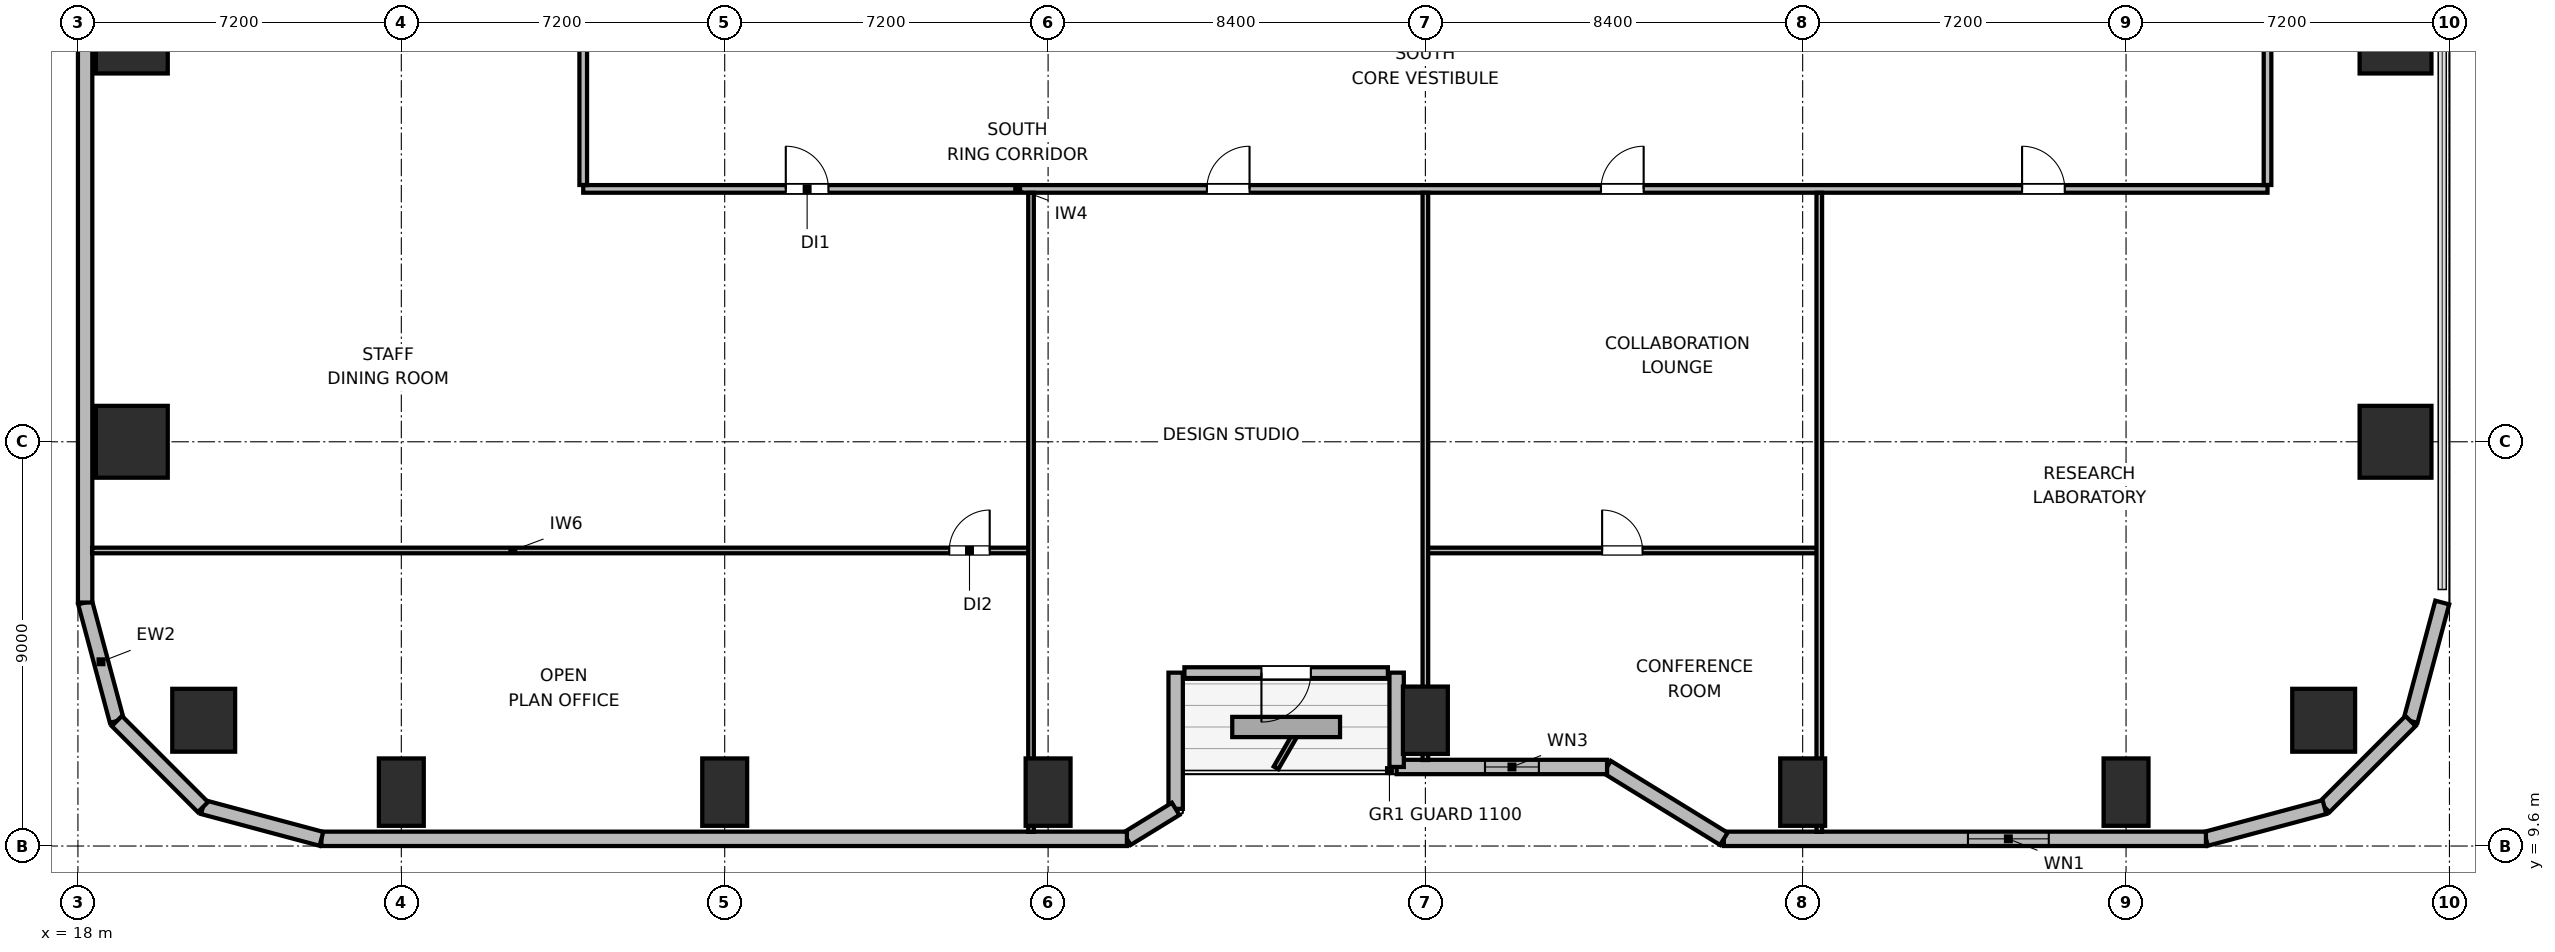
"""IFC4 building model, lengths in metres.
Left out: names, types, materials, properties, quantities, classifications, styles, units other than length and angle.
Written with IfcOpenShell. Run it as: python <this file> out.ifc"""

import sys

from ifc_helpers import new_model, si_unit, direction, frame, frame_2d, origin, origin_2d, place, context, subcontext, project, spatial, rectangle, circle, extrude, element, fill, save


model = new_model("IFC4")
c1 = context("Model", 3, precision=1e-05, world=origin(), true_north=direction((0.0, 1.0)))
c2 = subcontext(c1, "Body", "Model", "MODEL_VIEW")
j1 = project(units=[si_unit("LENGTHUNIT", "METRE"), si_unit("PLANEANGLEUNIT", "RADIAN")], contexts=[c1])
p1 = place(None, origin())
s1 = spatial("IfcSite", under=j1, at=p1, CompositionType="ELEMENT")
p2 = place(p1, origin())
s2 = spatial("IfcBuilding", under=s1, at=p2, CompositionType="ELEMENT")
p3 = place(p2, frame((0.0, 0.0, 85.8)))
s3 = spatial("IfcBuildingStorey", under=s2, at=p3, CompositionType="ELEMENT", Elevation=85.8)
for number, where, z_axis, x_axis in (
    (1, (20.8, 12.4, 0.0), (0.0, 0.0, 1.0), (1.0, 0.0, 0.0)),
    (2, (68.0, 12.4, 0.0), (0.0, 0.0, 1.0), (1.0, 0.0, 0.0)),
):
    element("IfcColumn", number, at=place(p3, frame(where, z_axis=z_axis, x_axis=x_axis)), inside=s3, PredefinedType="COLUMN", context=c2, shape_type="SweptSolid", body=[
        extrude(circle(Radius=0.7, at=origin_2d()), origin(), (0.0, 0.0, 1.0), 3.9),
    ])
for number, where, z_axis, x_axis in (
    (3, (25.2, 10.8, 0.0), (0.0, 0.0, 1.0), (1.0, 0.0, 0.0)),
    (4, (32.4, 10.8, 0.0), (0.0, 0.0, 1.0), (1.0, 0.0, 0.0)),
    (5, (39.6, 10.8, 0.0), (0.0, 0.0, 1.0), (1.0, 0.0, 0.0)),
    (6, (48.0, 12.4, 0.0), (0.0, 0.0, 1.0), (1.0, 0.0, 0.0)),
    (7, (56.4, 10.8, 0.0), (0.0, 0.0, 1.0), (1.0, 0.0, 0.0)),
    (8, (63.6, 10.8, 0.0), (0.0, 0.0, 1.0), (1.0, 0.0, 0.0)),
):
    element("IfcColumn", number, at=place(p3, frame(where, z_axis=z_axis, x_axis=x_axis)), inside=s3, PredefinedType="COLUMN", context=c2, shape_type="SweptSolid", body=[
        extrude(rectangle(XDim=1.0, YDim=1.5, at=origin_2d()), origin(), (0.0, 0.0, 1.0), 3.9),
    ])
for number, where, z_axis, x_axis in (
    (9, (19.2, 18.6, 0.0), (0.0, 0.0, 1.0), (1.0, 0.0, 0.0)),
    (10, (69.6, 18.6, 0.0), (0.0, 0.0, 1.0), (1.0, 0.0, 0.0)),
    (11, (19.2, 27.6, 0.0), (0.0, 0.0, 1.0), (1.0, 0.0, 0.0)),
    (12, (69.6, 27.6, 0.0), (0.0, 0.0, 1.0), (1.0, 0.0, 0.0)),
):
    element("IfcColumn", number, at=place(p3, frame(where, z_axis=z_axis, x_axis=x_axis)), inside=s3, PredefinedType="COLUMN", context=c2, shape_type="SweptSolid", body=[
        extrude(rectangle(XDim=1.6, YDim=1.6, at=origin_2d()), origin(), (0.0, 0.0, 1.0), 3.9),
    ])
p4 = place(p3, frame((18.866, 12.383, 0.0), z_axis=(0.0, 0.0, 1.0), x_axis=(-0.25869736047, 0.965958423373, 0.0)))
e13 = element("IfcWall", 13, at=p4, inside=s3, PredefinedType="SOLIDWALL", context=c2, shape_type="SweptSolid", body=[
    extrude(rectangle(XDim=2.731, YDim=0.32, at=frame_2d((1.366, 0.0))), origin(), (0.0, 0.0, 1.0), 3.64),
])
p5 = place(p3, frame((18.16, 15.021, 0.0), z_axis=(0.0, 0.0, 1.0), x_axis=(0.0, 1.0, 0.0)))
e14 = element("IfcWall", 14, at=p5, inside=s3, PredefinedType="SOLIDWALL", context=c2, shape_type="SweptSolid", body=[
    extrude(rectangle(XDim=14.219, YDim=0.32, at=frame_2d((7.109, 0.0))), origin(), (0.0, 0.0, 1.0), 3.64),
])
p6 = place(p3, frame((70.64, 15.021, 0.0), z_axis=(0.0, 0.0, 1.0), x_axis=(-0.258613949072, -0.965980758269, 0.0)))
e15 = element("IfcWall", 15, at=p6, inside=s3, PredefinedType="SOLIDWALL", context=c2, shape_type="SweptSolid", body=[
    extrude(rectangle(XDim=2.731, YDim=0.32, at=frame_2d((1.366, 0.0))), origin(), (0.0, 0.0, 1.0), 3.64),
])
p7 = place(p3, frame((69.934, 12.383, 0.0), z_axis=(0.0, 0.0, 1.0), x_axis=(-0.707151821269, -0.707061738235, 0.0)))
e16 = element("IfcWall", 16, at=p7, inside=s3, PredefinedType="SOLIDWALL", context=c2, shape_type="SweptSolid", body=[
    extrude(rectangle(XDim=2.71, YDim=0.32, at=frame_2d((1.355, 0.0))), origin(), (0.0, 0.0, 1.0), 3.64),
])
p8 = place(p3, frame((68.017, 10.467, 0.0), z_axis=(0.0, 0.0, 1.0), x_axis=(-0.965958423373, -0.25869736047, 0.0)))
e17 = element("IfcWall", 17, at=p8, inside=s3, PredefinedType="SOLIDWALL", context=c2, shape_type="SweptSolid", body=[
    extrude(rectangle(XDim=2.731, YDim=0.32, at=frame_2d((1.366, 0.0))), origin(), (0.0, 0.0, 1.0), 3.64),
])
p9 = place(p3, frame((65.379, 9.76, 0.0), z_axis=(0.0, 0.0, 1.0), x_axis=(-1.0, 0.0, 0.0)))
e18 = element("IfcWall", 18, at=p9, inside=s3, PredefinedType="SOLIDWALL", context=c2, shape_type="SweptSolid", body=[
    extrude(rectangle(XDim=10.734, YDim=0.32, at=frame_2d((5.367, 0.0))), origin(), (0.0, 0.0, 1.0), 3.64),
])
p10 = place(p9, frame((3.499, 0.0, 0.85)))
e19 = element("IfcOpeningElement", 19, at=p10, cuts=e18, PredefinedType="OPENING", context=c2, shape_type="SweptSolid", body=[
    extrude(rectangle(XDim=1.8, YDim=1.1, at=frame_2d((0.9, 0.55))), frame((0.0, 0.17, 0.0), z_axis=(0.0, -1.0, 0.0), x_axis=(1.0, 0.0, 0.0)), (0.0, 0.0, 1.0), 0.34),
])
p11 = place(p3, frame((54.645, 9.76, 0.0), z_axis=(0.0, 0.0, 1.0), x_axis=(-0.851630857047, 0.524142044989, 0.0)))
e20 = element("IfcWall", 20, at=p11, inside=s3, PredefinedType="SOLIDWALL", context=c2, shape_type="SweptSolid", body=[
    extrude(rectangle(XDim=3.053, YDim=0.32, at=frame_2d((1.526, 0.0))), origin(), (0.0, 0.0, 1.0), 2.875),
])
p12 = place(p3, frame((52.045, 11.36, 0.0), z_axis=(0.0, 0.0, 1.0), x_axis=(-1.0, 0.0, 0.0)))
e21 = element("IfcWall", 21, at=p12, inside=s3, PredefinedType="SOLIDWALL", context=c2, shape_type="SweptSolid", body=[
    extrude(rectangle(XDim=4.685, YDim=0.32, at=frame_2d((2.343, 0.0))), origin(), (0.0, 0.0, 1.0), 2.875),
])
p13 = place(p12, frame((1.518, 0.0, 0.85)))
e22 = element("IfcOpeningElement", 22, at=p13, cuts=e21, PredefinedType="OPENING", context=c2, shape_type="SweptSolid", body=[
    extrude(rectangle(XDim=1.2, YDim=1.1, at=frame_2d((0.6, 0.55))), frame((0.0, 0.17, 0.0), z_axis=(0.0, -1.0, 0.0), x_axis=(1.0, 0.0, 0.0)), (0.0, 0.0, 1.0), 0.34),
])
p14 = place(p3, frame((47.36, 11.36, 0.0), z_axis=(0.0, 0.0, 1.0), x_axis=(0.0, 1.0, 0.0)))
e23 = element("IfcWall", 23, at=p14, inside=s3, PredefinedType="SOLIDWALL", context=c2, shape_type="SweptSolid", body=[
    extrude(rectangle(XDim=2.1, YDim=0.32, at=frame_2d((1.05, 0.0))), origin(), (0.0, 0.0, 1.0), 2.875),
])
p15 = place(p3, frame((47.165, 13.46, 0.0), z_axis=(0.0, 0.0, 1.0), x_axis=(-1.0, 0.0, 0.0)))
e24 = element("IfcWall", 24, at=p15, inside=s3, PredefinedType="SOLIDWALL", context=c2, shape_type="SweptSolid", body=[
    extrude(rectangle(XDim=4.53, YDim=0.24, at=frame_2d((2.265, 0.0))), origin(), (0.0, 0.0, 1.0), 3.64),
])
p16 = place(p15, frame((1.715, 0.0, 0.0)))
e25 = element("IfcOpeningElement", 25, at=p16, cuts=e24, PredefinedType="OPENING", context=c2, shape_type="SweptSolid", body=[
    extrude(rectangle(XDim=1.1, YDim=2.04, at=frame_2d((0.55, 1.02))), frame((0.0, 0.13, 0.0), z_axis=(0.0, -1.0, 0.0), x_axis=(1.0, 0.0, 0.0)), (0.0, 0.0, 1.0), 0.26),
])
p17 = place(p3, frame((42.44, 13.46, 0.0), z_axis=(0.0, 0.0, 1.0), x_axis=(0.0, -1.0, 0.0)))
e26 = element("IfcWall", 26, at=p17, inside=s3, PredefinedType="SOLIDWALL", context=c2, shape_type="SweptSolid", body=[
    extrude(rectangle(XDim=3.032, YDim=0.32, at=frame_2d((1.516, 0.0))), origin(), (0.0, 0.0, 1.0), 2.875),
])
p18 = place(p3, frame((42.44, 10.427, 0.0), z_axis=(0.0, 0.0, 1.0), x_axis=(-0.851776724646, -0.523904964045, 0.0)))
e27 = element("IfcWall", 27, at=p18, inside=s3, PredefinedType="SOLIDWALL", context=c2, shape_type="SweptSolid", body=[
    extrude(rectangle(XDim=1.274, YDim=0.32, at=frame_2d((0.637, 0.0))), origin(), (0.0, 0.0, 1.0), 3.64),
])
p19 = place(p3, frame((41.355, 9.76, 0.0), z_axis=(0.0, 0.0, 1.0), x_axis=(-1.0, 0.0, 0.0)))
e28 = element("IfcWall", 28, at=p19, inside=s3, PredefinedType="SOLIDWALL", context=c2, shape_type="SweptSolid", body=[
    extrude(rectangle(XDim=17.934, YDim=0.32, at=frame_2d((8.967, 0.0))), origin(), (0.0, 0.0, 1.0), 3.64),
])
p20 = place(p3, frame((23.421, 9.76, 0.0), z_axis=(0.0, 0.0, 1.0), x_axis=(-0.965964405026, 0.25867502435, 0.0)))
e29 = element("IfcWall", 29, at=p20, inside=s3, PredefinedType="SOLIDWALL", context=c2, shape_type="SweptSolid", body=[
    extrude(rectangle(XDim=2.731, YDim=0.32, at=frame_2d((1.366, 0.0))), origin(), (0.0, 0.0, 1.0), 3.64),
])
p21 = place(p3, frame((20.783, 10.467, 0.0), z_axis=(0.0, 0.0, 1.0), x_axis=(-0.707106781187, 0.707106781187, 0.0)))
e30 = element("IfcWall", 30, at=p21, inside=s3, PredefinedType="SOLIDWALL", context=c2, shape_type="SweptSolid", body=[
    extrude(rectangle(XDim=2.71, YDim=0.32, at=frame_2d((1.355, 0.0))), origin(), (0.0, 0.0, 1.0), 3.64),
])
p22 = place(p3, frame((29.25, 24.23, 0.0), z_axis=(0.0, 0.0, 1.0), x_axis=(1.0, 0.0, 0.0)))
e31 = element("IfcWall", 31, at=p22, inside=s3, PredefinedType="PARTITIONING", context=c2, shape_type="SweptSolid", body=[
    extrude(rectangle(XDim=37.5, YDim=0.17, at=frame_2d((18.75, 0.0))), origin(), (0.0, 0.0, 1.0), 3.64),
])
p23 = place(p22, frame((4.51, 0.0, 0.0)))
e32 = element("IfcOpeningElement", 32, at=p23, cuts=e31, PredefinedType="OPENING", context=c2, shape_type="SweptSolid", body=[
    extrude(rectangle(XDim=0.95, YDim=2.04, at=frame_2d((0.475, 1.02))), frame((0.0, 0.095, 0.0), z_axis=(0.0, -1.0, 0.0), x_axis=(1.0, 0.0, 0.0)), (0.0, 0.0, 1.0), 0.19),
])
p24 = place(p22, frame((13.885, 0.0, 0.0)))
e33 = element("IfcOpeningElement", 33, at=p24, cuts=e31, PredefinedType="OPENING", context=c2, shape_type="SweptSolid", body=[
    extrude(rectangle(XDim=0.95, YDim=2.04, at=frame_2d((0.475, 1.02))), frame((0.0, 0.095, 0.0), z_axis=(0.0, -1.0, 0.0), x_axis=(1.0, 0.0, 0.0)), (0.0, 0.0, 1.0), 0.19),
])
p25 = place(p22, frame((22.66, 0.0, 0.0)))
e34 = element("IfcOpeningElement", 34, at=p25, cuts=e31, PredefinedType="OPENING", context=c2, shape_type="SweptSolid", body=[
    extrude(rectangle(XDim=0.95, YDim=2.04, at=frame_2d((0.475, 1.02))), frame((0.0, 0.095, 0.0), z_axis=(0.0, -1.0, 0.0), x_axis=(1.0, 0.0, 0.0)), (0.0, 0.0, 1.0), 0.19),
])
p26 = place(p22, frame((32.035, 0.0, 0.0)))
e35 = element("IfcOpeningElement", 35, at=p26, cuts=e31, PredefinedType="OPENING", context=c2, shape_type="SweptSolid", body=[
    extrude(rectangle(XDim=0.95, YDim=2.04, at=frame_2d((0.475, 1.02))), frame((0.0, 0.095, 0.0), z_axis=(0.0, -1.0, 0.0), x_axis=(1.0, 0.0, 0.0)), (0.0, 0.0, 1.0), 0.19),
])
p27 = place(p3, frame((29.25, 24.317, 0.0), z_axis=(0.0, 0.0, 1.0), x_axis=(0.0, 1.0, 0.0)))
e36 = element("IfcWall", 36, at=p27, inside=s3, PredefinedType="PARTITIONING", context=c2, shape_type="SweptSolid", body=[
    extrude(rectangle(XDim=23.366, YDim=0.17, at=frame_2d((11.683, 0.0))), origin(), (0.0, 0.0, 1.0), 3.64),
])
p28 = place(p27, frame((4.023, 0.0, 0.0)))
e37 = element("IfcOpeningElement", 37, at=p28, cuts=e36, PredefinedType="OPENING", context=c2, shape_type="SweptSolid", body=[
    extrude(rectangle(XDim=0.95, YDim=2.04, at=frame_2d((0.475, 1.02))), frame((0.0, 0.095, 0.0), z_axis=(0.0, -1.0, 0.0), x_axis=(1.0, 0.0, 0.0)), (0.0, 0.0, 1.0), 0.19),
])
p29 = place(p27, frame((11.808, 0.0, 0.0)))
e38 = element("IfcOpeningElement", 38, at=p29, cuts=e36, PredefinedType="OPENING", context=c2, shape_type="SweptSolid", body=[
    extrude(rectangle(XDim=0.95, YDim=2.04, at=frame_2d((0.475, 1.02))), frame((0.0, 0.095, 0.0), z_axis=(0.0, -1.0, 0.0), x_axis=(1.0, 0.0, 0.0)), (0.0, 0.0, 1.0), 0.19),
])
p30 = place(p27, frame((18.993, 0.0, 0.0)))
e39 = element("IfcOpeningElement", 39, at=p30, cuts=e36, PredefinedType="OPENING", context=c2, shape_type="SweptSolid", body=[
    extrude(rectangle(XDim=0.95, YDim=2.04, at=frame_2d((0.475, 1.02))), frame((0.0, 0.095, 0.0), z_axis=(0.0, -1.0, 0.0), x_axis=(1.0, 0.0, 0.0)), (0.0, 0.0, 1.0), 0.19),
])
p31 = place(p3, frame((66.75, 24.317, 0.0), z_axis=(0.0, 0.0, 1.0), x_axis=(0.0, 1.0, 0.0)))
e40 = element("IfcWall", 40, at=p31, inside=s3, PredefinedType="PARTITIONING", context=c2, shape_type="SweptSolid", body=[
    extrude(rectangle(XDim=23.366, YDim=0.17, at=frame_2d((11.683, 0.0))), origin(), (0.0, 0.0, 1.0), 3.64),
])
p32 = place(p31, frame((4.823, 0.0, 0.0)))
e41 = element("IfcOpeningElement", 41, at=p32, cuts=e40, PredefinedType="OPENING", context=c2, shape_type="SweptSolid", body=[
    extrude(rectangle(XDim=0.95, YDim=2.04, at=frame_2d((0.475, 1.02))), frame((0.0, 0.095, 0.0), z_axis=(0.0, -1.0, 0.0), x_axis=(1.0, 0.0, 0.0)), (0.0, 0.0, 1.0), 0.19),
])
p33 = place(p31, frame((16.593, 0.0, 0.0)))
e42 = element("IfcOpeningElement", 42, at=p33, cuts=e40, PredefinedType="OPENING", context=c2, shape_type="SweptSolid", body=[
    extrude(rectangle(XDim=0.95, YDim=2.04, at=frame_2d((0.475, 1.02))), frame((0.0, 0.095, 0.0), z_axis=(0.0, -1.0, 0.0), x_axis=(1.0, 0.0, 0.0)), (0.0, 0.0, 1.0), 0.19),
])
p34 = place(p3, frame((18.315, 16.18, 0.0), z_axis=(0.0, 0.0, 1.0), x_axis=(1.0, 0.0, 0.0)))
e43 = element("IfcWall", 43, at=p34, inside=s3, PredefinedType="PARTITIONING", context=c2, shape_type="SweptSolid", body=[
    extrude(rectangle(XDim=20.905, YDim=0.125, at=frame_2d((10.453, 0.0))), origin(), (0.0, 0.0, 1.0), 3.64),
])
p35 = place(p34, frame((19.085, 0.0, 0.0)))
e44 = element("IfcOpeningElement", 44, at=p35, cuts=e43, PredefinedType="OPENING", context=c2, shape_type="SweptSolid", body=[
    extrude(rectangle(XDim=0.9, YDim=2.02, at=frame_2d((0.45, 1.01))), frame((0.0, 0.073, 0.0), z_axis=(0.0, -1.0, 0.0), x_axis=(1.0, 0.0, 0.0)), (0.0, 0.0, 1.0), 0.145),
])
p36 = place(p3, frame((39.22, 9.915, 0.0), z_axis=(0.0, 0.0, 1.0), x_axis=(0.0, 1.0, 0.0)))
e45 = element("IfcWall", 45, at=p36, inside=s3, PredefinedType="PARTITIONING", context=c2, shape_type="SweptSolid", body=[
    extrude(rectangle(XDim=14.228, YDim=0.125, at=frame_2d((7.114, 0.0))), origin(), (0.0, 0.0, 1.0), 3.64),
])
p37 = place(p3, frame((48.0, 16.18, 0.0), z_axis=(0.0, 0.0, 1.0), x_axis=(1.0, 0.0, 0.0)))
e46 = element("IfcWall", 46, at=p37, inside=s3, PredefinedType="PARTITIONING", context=c2, shape_type="SweptSolid", body=[
    extrude(rectangle(XDim=8.77, YDim=0.125, at=frame_2d((4.385, 0.0))), origin(), (0.0, 0.0, 1.0), 3.64),
])
p38 = place(p37, frame((3.935, 0.0, 0.0)))
e47 = element("IfcOpeningElement", 47, at=p38, cuts=e46, PredefinedType="OPENING", context=c2, shape_type="SweptSolid", body=[
    extrude(rectangle(XDim=0.9, YDim=2.02, at=frame_2d((0.45, 1.01))), frame((0.0, 0.073, 0.0), z_axis=(0.0, -1.0, 0.0), x_axis=(1.0, 0.0, 0.0)), (0.0, 0.0, 1.0), 0.145),
])
p39 = place(p3, frame((48.0, 11.515, 0.0), z_axis=(0.0, 0.0, 1.0), x_axis=(0.0, 1.0, 0.0)))
e48 = element("IfcWall", 48, at=p39, inside=s3, PredefinedType="PARTITIONING", context=c2, shape_type="SweptSolid", body=[
    extrude(rectangle(XDim=12.628, YDim=0.125, at=frame_2d((6.314, 0.0))), origin(), (0.0, 0.0, 1.0), 3.003),
])
p40 = place(p3, frame((56.77, 9.915, 0.0), z_axis=(0.0, 0.0, 1.0), x_axis=(0.0, 1.0, 0.0)))
e49 = element("IfcWall", 49, at=p40, inside=s3, PredefinedType="PARTITIONING", context=c2, shape_type="SweptSolid", body=[
    extrude(rectangle(XDim=14.228, YDim=0.125, at=frame_2d((7.114, 0.0))), origin(), (0.0, 0.0, 1.0), 3.64),
])
p41 = place(p10, origin())
e50 = element("IfcWindow", 50, at=p41, inside=s3, PartitioningType="SINGLE_PANEL", PredefinedType="WINDOW", context=c2, shape_type="SweptSolid", body=[
    extrude(rectangle(XDim=1.8, YDim=1.1, at=frame_2d((0.9, 0.55))), frame((0.0, 0.03, 0.0), z_axis=(0.0, -1.0, 0.0), x_axis=(1.0, 0.0, 0.0)), (0.0, 0.0, 1.0), 0.06),
])
fill(e19, e50)
p42 = place(p13, origin())
e51 = element("IfcWindow", 51, at=p42, inside=s3, PartitioningType="SINGLE_PANEL", PredefinedType="WINDOW", context=c2, shape_type="SweptSolid", body=[
    extrude(rectangle(XDim=1.2, YDim=1.1, at=frame_2d((0.6, 0.55))), frame((0.0, 0.03, 0.0), z_axis=(0.0, -1.0, 0.0), x_axis=(1.0, 0.0, 0.0)), (0.0, 0.0, 1.0), 0.06),
])
fill(e22, e51)
p43 = place(p16, origin())
e52 = element("IfcDoor", 52, at=p43, inside=s3, OperationType="SINGLE_SWING_RIGHT", PredefinedType="DOOR", context=c2, shape_type="SweptSolid", body=[
    extrude(rectangle(XDim=1.1, YDim=2.04, at=frame_2d((0.55, 1.02))), frame((0.0, 0.025, 0.0), z_axis=(0.0, -1.0, 0.0), x_axis=(1.0, 0.0, 0.0)), (0.0, 0.0, 1.0), 0.05),
])
fill(e25, e52)
p44 = place(p35, origin())
e53 = element("IfcDoor", 53, at=p44, inside=s3, OperationType="SINGLE_SWING_RIGHT", PredefinedType="DOOR", context=c2, shape_type="SweptSolid", body=[
    extrude(rectangle(XDim=0.9, YDim=2.02, at=frame_2d((0.45, 1.01))), frame((0.0, 0.025, 0.0), z_axis=(0.0, -1.0, 0.0), x_axis=(1.0, 0.0, 0.0)), (0.0, 0.0, 1.0), 0.05),
])
fill(e44, e53)
p45 = place(p23, origin())
e54 = element("IfcDoor", 54, at=p45, inside=s3, OperationType="SINGLE_SWING_LEFT", PredefinedType="DOOR", context=c2, shape_type="SweptSolid", body=[
    extrude(rectangle(XDim=0.95, YDim=2.04, at=frame_2d((0.475, 1.02))), frame((0.0, 0.025, 0.0), z_axis=(0.0, -1.0, 0.0), x_axis=(1.0, 0.0, 0.0)), (0.0, 0.0, 1.0), 0.05),
])
fill(e32, e54)
p46 = place(p24, origin())
e55 = element("IfcDoor", 55, at=p46, inside=s3, OperationType="SINGLE_SWING_RIGHT", PredefinedType="DOOR", context=c2, shape_type="SweptSolid", body=[
    extrude(rectangle(XDim=0.95, YDim=2.04, at=frame_2d((0.475, 1.02))), frame((0.0, 0.025, 0.0), z_axis=(0.0, -1.0, 0.0), x_axis=(1.0, 0.0, 0.0)), (0.0, 0.0, 1.0), 0.05),
])
fill(e33, e55)
p47 = place(p38, origin())
e56 = element("IfcDoor", 56, at=p47, inside=s3, OperationType="SINGLE_SWING_LEFT", PredefinedType="DOOR", context=c2, shape_type="SweptSolid", body=[
    extrude(rectangle(XDim=0.9, YDim=2.02, at=frame_2d((0.45, 1.01))), frame((0.0, 0.025, 0.0), z_axis=(0.0, -1.0, 0.0), x_axis=(1.0, 0.0, 0.0)), (0.0, 0.0, 1.0), 0.05),
])
fill(e47, e56)
p48 = place(p25, origin())
e57 = element("IfcDoor", 57, at=p48, inside=s3, OperationType="SINGLE_SWING_RIGHT", PredefinedType="DOOR", context=c2, shape_type="SweptSolid", body=[
    extrude(rectangle(XDim=0.95, YDim=2.04, at=frame_2d((0.475, 1.02))), frame((0.0, 0.025, 0.0), z_axis=(0.0, -1.0, 0.0), x_axis=(1.0, 0.0, 0.0)), (0.0, 0.0, 1.0), 0.05),
])
fill(e34, e57)
p49 = place(p26, origin())
e58 = element("IfcDoor", 58, at=p49, inside=s3, OperationType="SINGLE_SWING_LEFT", PredefinedType="DOOR", context=c2, shape_type="SweptSolid", body=[
    extrude(rectangle(XDim=0.95, YDim=2.04, at=frame_2d((0.475, 1.02))), frame((0.0, 0.025, 0.0), z_axis=(0.0, -1.0, 0.0), x_axis=(1.0, 0.0, 0.0)), (0.0, 0.0, 1.0), 0.05),
])
fill(e35, e58)
save(model, sys.argv[1])
